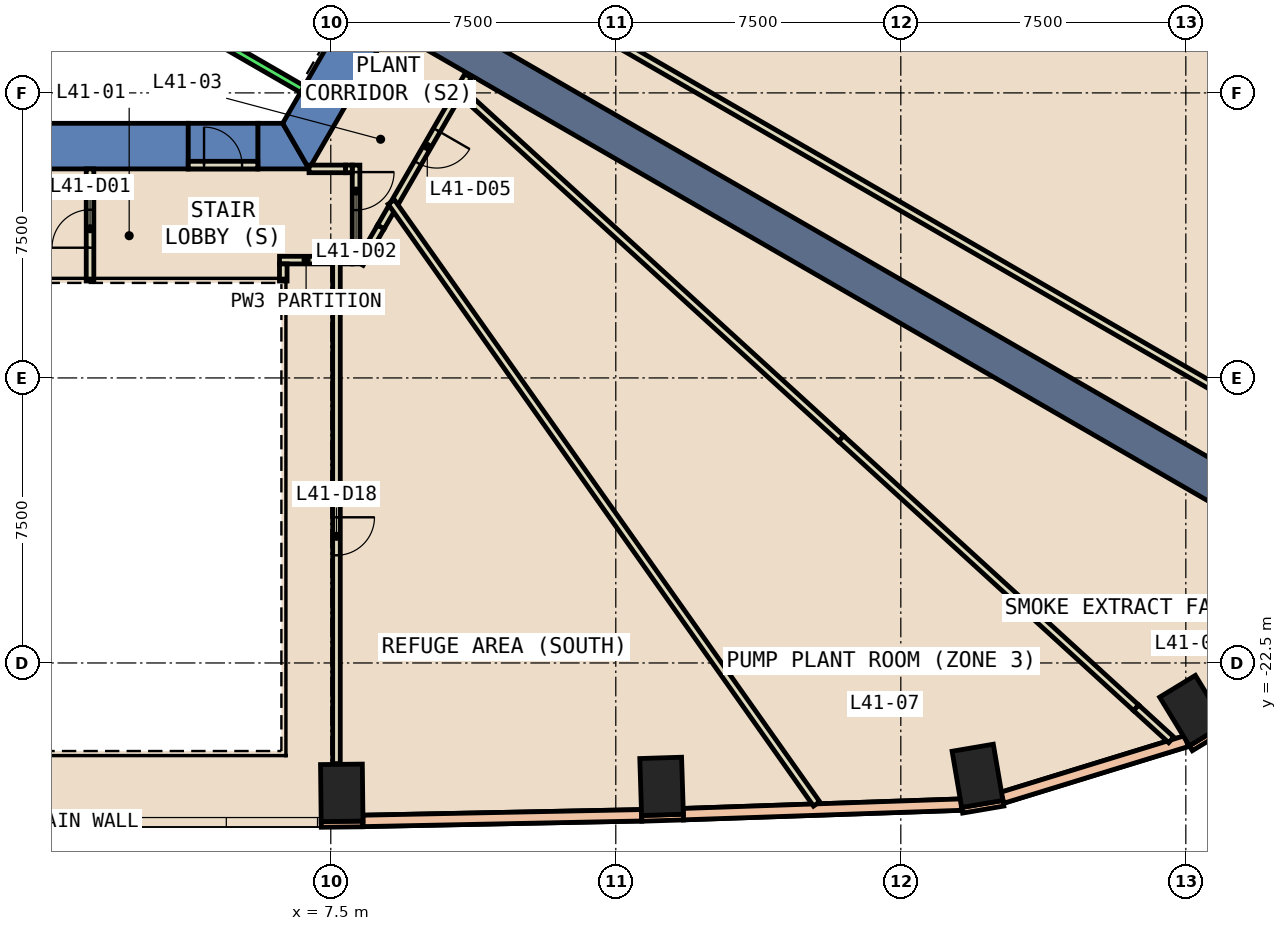
"""IFC4 building model, lengths in metres.
Left out: names, types, materials, properties, quantities, classifications, styles, units other than length and angle.
Written with IfcOpenShell. Run it as: python <this file> out.ifc"""

import sys

from ifc_helpers import new_model, si_unit, direction, frame, frame_2d, origin, origin_2d, place, context, subcontext, project, spatial, polyline, rectangle, outline, extrude, element, fill, save


model = new_model("IFC4")
c1 = context("Model", 3, precision=1e-05, world=origin(), true_north=direction((0.0, 1.0)))
c2 = subcontext(c1, "Body", "Model", "MODEL_VIEW")
j1 = project(units=[si_unit("LENGTHUNIT", "METRE"), si_unit("PLANEANGLEUNIT", "RADIAN")], contexts=[c1])
p1 = place(None, origin())
s1 = spatial("IfcSite", under=j1, at=p1, CompositionType="ELEMENT")
p2 = place(p1, origin())
s2 = spatial("IfcBuilding", under=s1, at=p2, CompositionType="ELEMENT")
p3 = place(p2, frame((0.0, 0.0, 184.4)))
s3 = spatial("IfcBuildingStorey", under=s2, at=p3, CompositionType="ELEMENT", Elevation=184.4)
for number, where, z_axis, x_axis in (
    (1, (7.789, -25.917, -0.6), (0.0, 0.0, 1.0), (1.0, 0.012, 0.0)),
    (2, (16.205, -25.747, -0.6), (0.0, 0.0, 1.0), (0.999, 0.032, 0.0)),
    (3, (24.518, -25.47, -0.6), (0.0, 0.0, 1.0), (0.986, 0.168, 0.0)),
    (4, (30.172, -23.754, -0.6), (0.0, 0.0, 1.0), (0.854, 0.521, 0.0)),
):
    element("IfcColumn", number, at=place(p3, frame(where, z_axis=z_axis, x_axis=x_axis)), inside=s3, PredefinedType="COLUMN", context=c2, shape_type="SweptSolid", body=[
        extrude(rectangle(XDim=1.1, YDim=1.5, at=origin_2d()), origin(), (0.0, 0.0, 1.0), 5.4),
    ])
p4 = place(p3, frame((0.0, 0.0, -0.6)))
e5 = element("IfcWall", 5, at=p4, inside=s3, PredefinedType="SHEAR", context=c2, shape_type="SweptSolid", body=[
    extrude(outline(polyline([(3.75, -9.5), (3.75, -8.3), (-6.235, -8.3), (-6.928, -9.5), (3.75, -9.5)])), origin(), (0.0, 0.0, 1.0), 5.4),
])
p5 = place(p3, frame((0.0, 0.0, -0.6)))
e6 = element("IfcWall", 6, at=p5, inside=s3, PredefinedType="SHEAR", context=c2, shape_type="SweptSolid", body=[
    extrude(outline(polyline([(5.58, -8.3), (5.58, -9.5), (6.928, -9.5), (6.235, -8.3), (5.58, -8.3)])), origin(), (0.0, 0.0, 1.0), 5.4),
])
p6 = place(p3, frame((0.0, 0.0, 3.6)))
e7 = element("IfcWall", 7, at=p6, inside=s3, PredefinedType="SHEAR", context=c2, shape_type="SweptSolid", body=[
    extrude(outline(polyline([(5.58, -9.5), (5.58, -8.3), (3.75, -8.3), (3.75, -9.5), (5.58, -9.5)])), origin(), (0.0, 0.0, 1.0), 1.2),
])
p7 = place(p3, frame((0.0, 0.0, -0.6)))
e8 = element("IfcWall", 8, at=p7, inside=s3, PredefinedType="SHEAR", context=c2, shape_type="SweptSolid", body=[
    extrude(outline(polyline([(6.928, -9.5), (13.856, 2.5), (12.471, 2.5), (6.235, -8.3), (6.928, -9.5)])), origin(), (0.0, 0.0, 1.0), 5.4),
])
p8 = place(p3, frame((9.31, -5.375, 0.0), z_axis=(0.0, 0.0, 1.0), x_axis=(0.866015103238, -0.500017840646, 0.0)))
e9 = element("IfcWall", 9, at=p8, inside=s3, PredefinedType="SHEAR", context=c2, shape_type="SweptSolid", body=[
    extrude(rectangle(XDim=27.139, YDim=1.0, at=frame_2d((13.57, 0.0))), origin(), (0.0, 0.0, 1.0), 4.8),
])
p9 = place(p3, frame((7.249, -26.748, 0.0), z_axis=(0.0, 0.0, 1.0), x_axis=(0.999940879068, 0.010873746799, 0.0)))
e10 = element("IfcWall", 10, at=p9, inside=s3, PredefinedType="STANDARD", context=c2, shape_type="SweptSolid", body=[
    extrude(rectangle(XDim=1.1, YDim=0.15, at=frame_2d((0.55, 0.0))), origin(), (0.0, 0.0, 1.0), 4.8),
])
p10 = place(p3, frame((15.682, -26.589, 0.0), z_axis=(0.0, 0.0, 1.0), x_axis=(0.99951682968, 0.031082264806, 0.0)))
e11 = element("IfcWall", 11, at=p10, inside=s3, PredefinedType="STANDARD", context=c2, shape_type="SweptSolid", body=[
    extrude(rectangle(XDim=1.1, YDim=0.15, at=frame_2d((0.55, 0.0))), origin(), (0.0, 0.0, 1.0), 4.8),
])
p11 = place(p3, frame((24.114, -26.376, 0.0), z_axis=(0.0, 0.0, 1.0), x_axis=(0.985763338892, 0.168138751323, 0.0)))
e12 = element("IfcWall", 12, at=p11, inside=s3, PredefinedType="STANDARD", context=c2, shape_type="SweptSolid", body=[
    extrude(rectangle(XDim=1.101, YDim=0.15, at=frame_2d((0.55, 0.0))), origin(), (0.0, 0.0, 1.0), 4.8),
])
p12 = place(p3, frame((30.132, -24.744, 0.0), z_axis=(0.0, 0.0, 1.0), x_axis=(0.854104197553, 0.520101932051, 0.0)))
e13 = element("IfcWall", 13, at=p12, inside=s3, PredefinedType="STANDARD", context=c2, shape_type="SweptSolid", body=[
    extrude(rectangle(XDim=1.099, YDim=0.15, at=frame_2d((0.55, 0.0))), origin(), (0.0, 0.0, 1.0), 4.8),
])
p13 = place(p3, frame((8.347, -26.656, 0.0), z_axis=(0.0, 0.0, 1.0), x_axis=(0.999796530884, 0.020171683903, 0.0)))
e14 = element("IfcWall", 14, at=p13, inside=s3, PredefinedType="STANDARD", context=c2, shape_type="SweptSolid", body=[
    extrude(rectangle(XDim=7.334, YDim=0.3, at=frame_2d((3.667, 0.0))), origin(), (0.0, 0.0, 1.0), 1.2),
])
p14 = place(p3, frame((8.347, -26.656, 4.0), z_axis=(0.0, 0.0, 1.0), x_axis=(0.999796530884, 0.020171683903, 0.0)))
e15 = element("IfcWall", 15, at=p14, inside=s3, PredefinedType="STANDARD", context=c2, shape_type="SweptSolid", body=[
    extrude(rectangle(XDim=7.334, YDim=0.3, at=frame_2d((3.667, 0.0))), origin(), (0.0, 0.0, 1.0), 0.8),
])
p15 = place(p3, frame((16.778, -26.478, 0.0), z_axis=(0.0, 0.0, 1.0), x_axis=(0.999411455851, 0.034303672007, 0.0)))
e16 = element("IfcWall", 16, at=p15, inside=s3, PredefinedType="STANDARD", context=c2, shape_type="SweptSolid", body=[
    extrude(rectangle(XDim=7.316, YDim=0.3, at=frame_2d((3.658, 0.0))), origin(), (0.0, 0.0, 1.0), 1.2),
])
p16 = place(p3, frame((16.778, -26.478, 4.0), z_axis=(0.0, 0.0, 1.0), x_axis=(0.999411455851, 0.034303672007, 0.0)))
e17 = element("IfcWall", 17, at=p16, inside=s3, PredefinedType="STANDARD", context=c2, shape_type="SweptSolid", body=[
    extrude(rectangle(XDim=7.316, YDim=0.3, at=frame_2d((3.658, 0.0))), origin(), (0.0, 0.0, 1.0), 0.8),
])
p17 = place(p3, frame((25.173, -26.045, 0.0), z_axis=(0.0, 0.0, 1.0), x_axis=(0.955892434745, 0.293716961031, 0.0)))
e18 = element("IfcWall", 18, at=p17, inside=s3, PredefinedType="STANDARD", context=c2, shape_type="SweptSolid", body=[
    extrude(rectangle(XDim=5.07, YDim=0.3, at=frame_2d((2.535, 0.0))), origin(), (0.0, 0.0, 1.0), 1.2),
])
p18 = place(p3, frame((25.173, -26.045, 4.0), z_axis=(0.0, 0.0, 1.0), x_axis=(0.955892434745, 0.293716961031, 0.0)))
e19 = element("IfcWall", 19, at=p18, inside=s3, PredefinedType="STANDARD", context=c2, shape_type="SweptSolid", body=[
    extrude(rectangle(XDim=5.07, YDim=0.3, at=frame_2d((2.535, 0.0))), origin(), (0.0, 0.0, 1.0), 0.8),
])
p19 = place(p3, frame((1.165, -12.45, 0.0), z_axis=(0.0, 0.0, 1.0), x_axis=(0.0, 1.0, 0.0)))
e20 = element("IfcWall", 20, at=p19, inside=s3, PredefinedType="PARTITIONING", context=c2, shape_type="SweptSolid", body=[
    extrude(rectangle(XDim=2.95, YDim=0.2, at=frame_2d((1.475, 0.0))), origin(), (0.0, 0.0, 1.0), 4.8),
])
p20 = place(p19, frame((0.876, 0.0, 0.0)))
e21 = element("IfcOpeningElement", 21, at=p20, cuts=e20, PredefinedType="OPENING", context=c2, shape_type="SweptSolid", body=[
    extrude(rectangle(XDim=1.0, YDim=2.1, at=frame_2d((0.5, 1.05))), frame((0.0, 0.11, 0.0), z_axis=(0.0, -1.0, 0.0), x_axis=(1.0, 0.0, 0.0)), (0.0, 0.0, 1.0), 0.22),
])
p21 = place(p3, frame((7.55, -11.9, 0.0), z_axis=(0.0, 0.0, 1.0), x_axis=(-1.0, 0.0, 0.0)))
e22 = element("IfcWall", 22, at=p21, inside=s3, PredefinedType="PARTITIONING", context=c2, shape_type="SweptSolid", body=[
    extrude(rectangle(XDim=1.399, YDim=0.2, at=frame_2d((0.7, 0.0))), origin(), (0.0, 0.0, 1.0), 4.8),
])
p22 = place(p3, frame((6.25, -12.0, 0.0), z_axis=(0.0, 0.0, 1.0), x_axis=(0.0, -1.0, 0.0)))
e23 = element("IfcWall", 23, at=p22, inside=s3, PredefinedType="PARTITIONING", context=c2, shape_type="SweptSolid", body=[
    extrude(rectangle(XDim=0.45, YDim=0.2, at=frame_2d((0.225, 0.0))), origin(), (0.0, 0.0, 1.0), 4.8),
])
p23 = place(p3, frame((6.928, -9.5, 0.0), z_axis=(0.0, 0.0, 1.0), x_axis=(1.0, 0.0, 0.0)))
e24 = element("IfcWall", 24, at=p23, inside=s3, PredefinedType="PARTITIONING", context=c2, shape_type="SweptSolid", body=[
    extrude(rectangle(XDim=0.962, YDim=0.2, at=frame_2d((0.481, 0.0))), origin(), (0.0, 0.0, 1.0), 2.4),
])
p24 = place(p3, frame((8.165, -9.4, 0.0), z_axis=(0.0, 0.0, 1.0), x_axis=(0.0, -1.0, 0.0)))
e25 = element("IfcWall", 25, at=p24, inside=s3, PredefinedType="PARTITIONING", context=c2, shape_type="SweptSolid", body=[
    extrude(rectangle(XDim=2.6, YDim=0.2, at=frame_2d((1.3, 0.0))), origin(), (0.0, 0.0, 1.0), 4.8),
])
p25 = place(p24, frame((0.184, 0.0, 0.0)))
e26 = element("IfcOpeningElement", 26, at=p25, cuts=e25, PredefinedType="OPENING", context=c2, shape_type="SweptSolid", body=[
    extrude(rectangle(XDim=1.0, YDim=2.1, at=frame_2d((0.5, 1.05))), frame((0.0, 0.11, 0.0), z_axis=(0.0, -1.0, 0.0), x_axis=(1.0, 0.0, 0.0)), (0.0, 0.0, 1.0), 0.22),
])
p26 = place(p3, frame((8.065, -11.9, 0.0), z_axis=(0.0, 0.0, 1.0), x_axis=(-1.0, 0.0, 0.0)))
e27 = element("IfcWall", 27, at=p26, inside=s3, PredefinedType="PARTITIONING", context=c2, shape_type="SweptSolid", body=[
    extrude(rectangle(XDim=0.315, YDim=0.2, at=frame_2d((0.157, 0.0))), origin(), (0.0, 0.0, 1.0), 4.8),
])
p27 = place(p3, frame((7.65, -11.8, 0.0), z_axis=(0.0, 0.0, 1.0), x_axis=(0.0, -1.0, 0.0)))
e28 = element("IfcWall", 28, at=p27, inside=s3, PredefinedType="PARTITIONING", context=c2, shape_type="SweptSolid", body=[
    extrude(rectangle(XDim=13.349, YDim=0.2, at=frame_2d((6.674, 0.0))), origin(), (0.0, 0.0, 1.0), 4.8),
])
p28 = place(p27, frame((6.867, 0.0, 0.0)))
e29 = element("IfcOpeningElement", 29, at=p28, cuts=e28, PredefinedType="OPENING", context=c2, shape_type="SweptSolid", body=[
    extrude(rectangle(XDim=1.0, YDim=2.1, at=frame_2d((0.5, 1.05))), frame((0.0, 0.11, 0.0), z_axis=(0.0, -1.0, 0.0), x_axis=(1.0, 0.0, 0.0)), (0.0, 0.0, 1.0), 0.22),
])
p29 = place(p3, frame((9.15, -10.451, 0.0), z_axis=(0.0, 0.0, 1.0), x_axis=(-0.499595985407, -0.8662585361, 0.0)))
e30 = element("IfcWall", 30, at=p29, inside=s3, PredefinedType="PARTITIONING", context=c2, shape_type="SweptSolid", body=[
    extrude(rectangle(XDim=0.668, YDim=0.2, at=frame_2d((0.334, 0.0))), origin(), (0.0, 0.0, 1.0), 4.8),
])
p30 = place(p3, frame((10.89, -7.437, 0.0), z_axis=(0.0, 0.0, 1.0), x_axis=(-0.499979528911, -0.866037222451, 0.0)))
e31 = element("IfcWall", 31, at=p30, inside=s3, PredefinedType="PARTITIONING", context=c2, shape_type="SweptSolid", body=[
    extrude(rectangle(XDim=3.48, YDim=0.2, at=frame_2d((1.74, 0.0))), origin(), (0.0, 0.0, 1.0), 4.8),
])
p31 = place(p30, frame((1.202, 0.0, 0.0)))
e32 = element("IfcOpeningElement", 32, at=p31, cuts=e31, PredefinedType="OPENING", context=c2, shape_type="SweptSolid", body=[
    extrude(rectangle(XDim=1.0, YDim=2.1, at=frame_2d((0.5, 1.05))), frame((0.0, 0.11, 0.0), z_axis=(0.0, -1.0, 0.0), x_axis=(1.0, 0.0, 0.0)), (0.0, 0.0, 1.0), 0.22),
])
p32 = place(p3, frame((11.113, -7.051, 0.0), z_axis=(0.0, 0.0, 1.0), x_axis=(-0.499207881238, -0.866482251007, 0.0)))
e33 = element("IfcWall", 33, at=p32, inside=s3, PredefinedType="PARTITIONING", context=c2, shape_type="SweptSolid", body=[
    extrude(rectangle(XDim=0.411, YDim=0.2, at=frame_2d((0.206, 0.0))), origin(), (0.0, 0.0, 1.0), 2.4),
])
p33 = place(p3, frame((9.092, -10.37, 0.0), z_axis=(0.0, 0.0, 1.0), x_axis=(0.57710323801, -0.816671202308, 0.0)))
e34 = element("IfcWall", 34, at=p33, inside=s3, PredefinedType="PARTITIONING", context=c2, shape_type="SweptSolid", body=[
    extrude(rectangle(XDim=19.393, YDim=0.2, at=frame_2d((9.697, 0.0))), origin(), (0.0, 0.0, 1.0), 4.8),
])
p34 = place(p3, frame((10.816, -7.37, 0.0), z_axis=(0.0, 0.0, 1.0), x_axis=(0.738734088882, -0.673996992519, 0.0)))
e35 = element("IfcWall", 35, at=p34, inside=s3, PredefinedType="PARTITIONING", context=c2, shape_type="SweptSolid", body=[
    extrude(rectangle(XDim=13.69, YDim=0.2, at=frame_2d((6.845, 0.0))), origin(), (0.0, 0.0, 1.0), 2.4),
])
p35 = place(p3, frame((12.384, -4.65, 0.0), z_axis=(0.0, 0.0, 1.0), x_axis=(0.866042267005, -0.499970790907, 0.0)))
e36 = element("IfcWall", 36, at=p35, inside=s3, PredefinedType="PARTITIONING", context=c2, shape_type="SweptSolid", body=[
    extrude(rectangle(XDim=25.02, YDim=0.2, at=frame_2d((12.51, 0.0))), origin(), (0.0, 0.0, 1.0), 4.8),
])
p36 = place(p3, frame((3.75, -9.4, 0.0), z_axis=(0.0, 0.0, 1.0), x_axis=(1.0, 0.0, 0.0)))
e37 = element("IfcWall", 37, at=p36, inside=s3, PredefinedType="PARTITIONING", context=c2, shape_type="SweptSolid", body=[
    extrude(rectangle(XDim=1.83, YDim=0.2, at=frame_2d((0.915, 0.0))), origin(), (0.0, 0.0, 1.0), 2.4),
])
p37 = place(p36, frame((0.415, 0.0, 0.0)))
e38 = element("IfcOpeningElement", 38, at=p37, cuts=e37, PredefinedType="OPENING", context=c2, shape_type="SweptSolid", body=[
    extrude(rectangle(XDim=1.0, YDim=2.1, at=frame_2d((0.5, 1.05))), frame((0.0, 0.11, 0.0), z_axis=(0.0, -1.0, 0.0), x_axis=(1.0, 0.0, 0.0)), (0.0, 0.0, 1.0), 0.22),
])
p38 = place(p3, frame((7.89, -9.5, 0.0), z_axis=(0.0, 0.0, 1.0), x_axis=(1.0, 0.0, 0.0)))
e39 = element("IfcWall", 39, at=p38, inside=s3, PredefinedType="PARTITIONING", context=c2, shape_type="SweptSolid", body=[
    extrude(rectangle(XDim=0.175, YDim=0.2, at=frame_2d((0.087, 0.0))), origin(), (0.0, 0.0, 1.0), 4.8),
])
p39 = place(p3, frame((8.816, -11.03, 0.0), z_axis=(0.0, 0.0, 1.0), x_axis=(-0.499633176362, -0.866237085952, 0.0)))
e40 = element("IfcWall", 40, at=p39, inside=s3, PredefinedType="PARTITIONING", context=c2, shape_type="SweptSolid", body=[
    extrude(rectangle(XDim=1.105, YDim=0.2, at=frame_2d((0.552, 0.0))), origin(), (0.0, 0.0, 1.0), 2.4),
])
p40 = place(p3, frame((20.929, -16.597, 0.0), z_axis=(0.0, 0.0, 1.0), x_axis=(0.738717318159, -0.674015373602, 0.0)))
e41 = element("IfcWall", 41, at=p40, inside=s3, PredefinedType="PARTITIONING", context=c2, shape_type="SweptSolid", body=[
    extrude(rectangle(XDim=10.509, YDim=0.2, at=frame_2d((5.254, 0.0))), origin(), (0.0, 0.0, 1.0), 4.8),
])
p41 = place(p3, frame((28.692, -23.68, 0.0), z_axis=(0.0, 0.0, 1.0), x_axis=(0.738764319848, -0.67396385639, 0.0)))
e42 = element("IfcWall", 42, at=p41, inside=s3, PredefinedType="PARTITIONING", context=c2, shape_type="SweptSolid", body=[
    extrude(rectangle(XDim=1.251, YDim=0.2, at=frame_2d((0.625, 0.0))), origin(), (0.0, 0.0, 1.0), 2.4),
])
p42 = place(p3, frame((4.588, -6.153, 0.0), z_axis=(0.0, 0.0, 1.0), x_axis=(0.866022959057, -0.500004234368, 0.0)))
e43 = element("IfcWall", 43, at=p42, inside=s3, PredefinedType="STANDARD", context=c2, shape_type="SweptSolid", body=[
    extrude(rectangle(XDim=2.5, YDim=0.2, at=frame_2d((1.25, 0.0))), origin(), (0.0, 0.0, 1.0), 4.8),
])
p43 = place(p20, origin())
e44 = element("IfcDoor", 44, at=p43, inside=s3, OperationType="SINGLE_SWING_LEFT", PredefinedType="DOOR", context=c2, shape_type="SweptSolid", body=[
    extrude(rectangle(XDim=1.0, YDim=2.1, at=frame_2d((0.5, 1.05))), frame((0.0, 0.025, 0.0), z_axis=(0.0, -1.0, 0.0), x_axis=(1.0, 0.0, 0.0)), (0.0, 0.0, 1.0), 0.05),
])
fill(e21, e44)
p44 = place(p25, origin())
e45 = element("IfcDoor", 45, at=p44, inside=s3, OperationType="SINGLE_SWING_RIGHT", PredefinedType="DOOR", context=c2, shape_type="SweptSolid", body=[
    extrude(rectangle(XDim=1.0, YDim=2.1, at=frame_2d((0.5, 1.05))), frame((0.0, 0.025, 0.0), z_axis=(0.0, -1.0, 0.0), x_axis=(1.0, 0.0, 0.0)), (0.0, 0.0, 1.0), 0.05),
])
fill(e26, e45)
p45 = place(p31, origin())
e46 = element("IfcDoor", 46, at=p45, inside=s3, OperationType="SINGLE_SWING_LEFT", PredefinedType="DOOR", context=c2, shape_type="SweptSolid", body=[
    extrude(rectangle(XDim=1.0, YDim=2.1, at=frame_2d((0.5, 1.05))), frame((0.0, 0.025, 0.0), z_axis=(0.0, -1.0, 0.0), x_axis=(1.0, 0.0, 0.0)), (0.0, 0.0, 1.0), 0.05),
])
fill(e32, e46)
p46 = place(p28, origin())
e47 = element("IfcDoor", 47, at=p46, inside=s3, OperationType="SINGLE_SWING_RIGHT", PredefinedType="DOOR", context=c2, shape_type="SweptSolid", body=[
    extrude(rectangle(XDim=1.0, YDim=2.1, at=frame_2d((0.5, 1.05))), frame((0.0, 0.025, 0.0), z_axis=(0.0, -1.0, 0.0), x_axis=(1.0, 0.0, 0.0)), (0.0, 0.0, 1.0), 0.05),
])
fill(e29, e47)
p47 = place(p37, origin())
e48 = element("IfcDoor", 48, at=p47, inside=s3, OperationType="SINGLE_SWING_LEFT", PredefinedType="DOOR", context=c2, shape_type="SweptSolid", body=[
    extrude(rectangle(XDim=1.0, YDim=2.1, at=frame_2d((0.5, 1.05))), frame((0.0, 0.025, 0.0), z_axis=(0.0, -1.0, 0.0), x_axis=(1.0, 0.0, 0.0)), (0.0, 0.0, 1.0), 0.05),
])
fill(e38, e48)
save(model, sys.argv[1])
